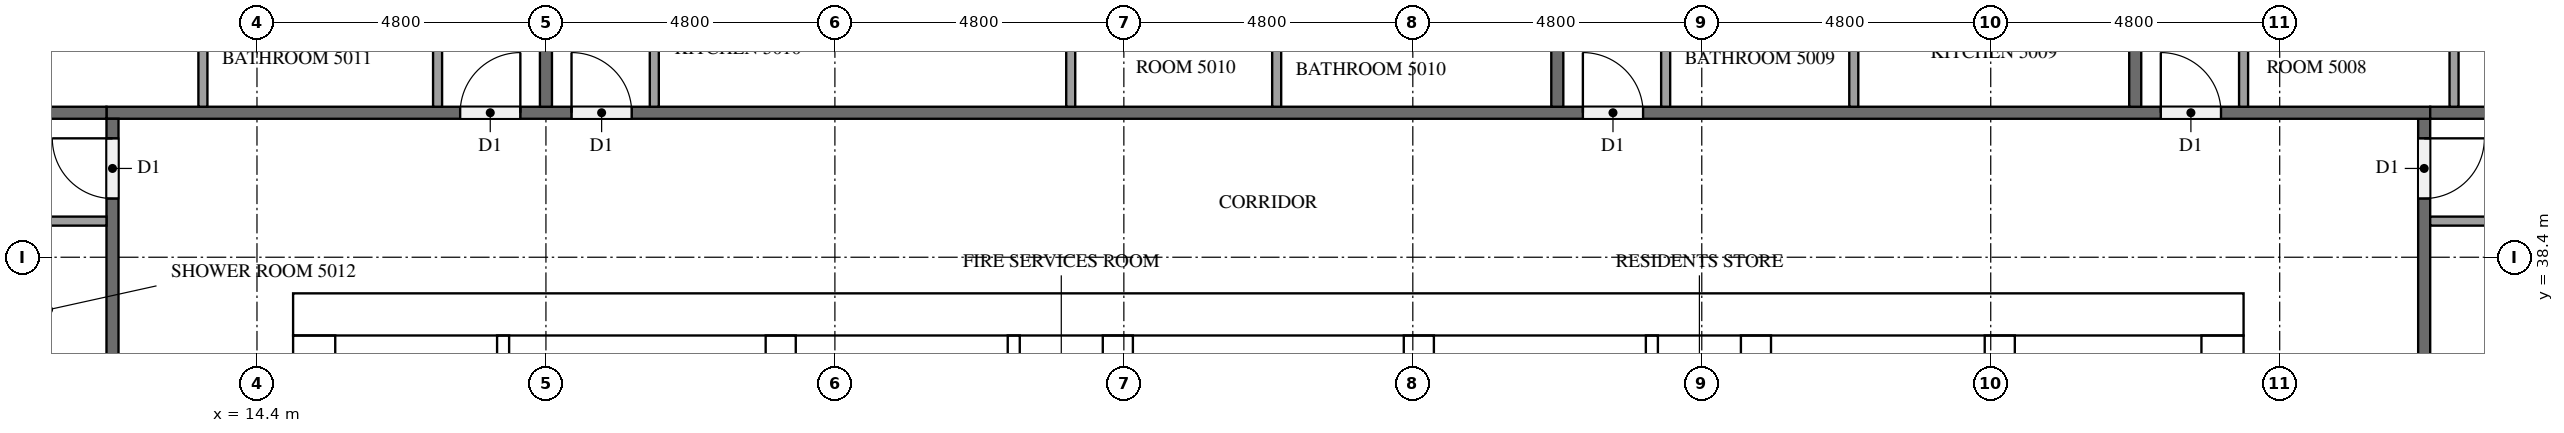
"""IFC4 building model, lengths in metres.
Left out: names, types, materials, properties, quantities, classifications, styles, units other than length and angle.
Written with IfcOpenShell. Run it as: python <this file> out.ifc"""

import sys

from ifc_helpers import new_model, si_unit, direction, frame, frame_2d, origin, place, context, subcontext, project, spatial, rectangle, extrude, element, fill, save


model = new_model("IFC4")
c1 = context("Model", 3, precision=1e-05, world=origin(), true_north=direction((0.0, 1.0)))
c2 = subcontext(c1, "Body", "Model", "MODEL_VIEW")
j1 = project(units=[si_unit("LENGTHUNIT", "METRE"), si_unit("PLANEANGLEUNIT", "RADIAN")], contexts=[c1])
p1 = place(None, origin())
s1 = spatial("IfcSite", under=j1, at=p1, CompositionType="ELEMENT")
p2 = place(p1, origin())
s2 = spatial("IfcBuilding", under=s1, at=p2, CompositionType="ELEMENT")
p3 = place(p2, frame((0.0, 0.0, 192.9)))
s3 = spatial("IfcBuildingStorey", under=s2, at=p3, CompositionType="ELEMENT", Elevation=192.9)
p4 = place(p3, frame((15.0, 37.45, 0.0), z_axis=(0.0, 0.0, 1.0), x_axis=(1.0, 0.0, 0.0)))
e1 = element("IfcWall", 1, at=p4, inside=s3, PredefinedType="SHEAR", context=c2, shape_type="SweptSolid", body=[
    extrude(rectangle(XDim=32.4, YDim=0.7, at=frame_2d((16.2, 0.0))), origin(), (0.0, 0.0, 1.0), 3.2),
])
p5 = place(p4, frame((15.3, 0.0, 0.0)))
e2 = element("IfcOpeningElement", 2, at=p5, cuts=e1, PredefinedType="OPENING", context=c2, shape_type="SweptSolid", body=[
    extrude(rectangle(XDim=1.8, YDim=2.1, at=frame_2d((0.9, 1.05))), frame((0.0, 0.36, 0.0), z_axis=(0.0, -1.0, 0.0), x_axis=(1.0, 0.0, 0.0)), (0.0, 0.0, 1.0), 0.72),
])
p6 = place(p4, frame((1.544, 0.0, 0.0)))
e3 = element("IfcOpeningElement", 3, at=p6, cuts=e1, PredefinedType="OPENING", context=c2, shape_type="SweptSolid", body=[
    extrude(rectangle(XDim=1.0, YDim=2.1, at=frame_2d((0.5, 1.05))), frame((0.0, 0.36, 0.0), z_axis=(0.0, -1.0, 0.0), x_axis=(1.0, 0.0, 0.0)), (0.0, 0.0, 1.0), 0.72),
])
p7 = place(p4, frame((5.219, 0.0, 0.0)))
e4 = element("IfcOpeningElement", 4, at=p7, cuts=e1, PredefinedType="OPENING", context=c2, shape_type="SweptSolid", body=[
    extrude(rectangle(XDim=1.0, YDim=2.1, at=frame_2d((0.5, 1.05))), frame((0.0, 0.36, 0.0), z_axis=(0.0, -1.0, 0.0), x_axis=(1.0, 0.0, 0.0)), (0.0, 0.0, 1.0), 0.72),
])
p8 = place(p3, frame((15.35, 15.7, 0.0), z_axis=(0.0, 0.0, 1.0), x_axis=(0.0, 1.0, 0.0)))
e5 = element("IfcWall", 5, at=p8, inside=s3, PredefinedType="SHEAR", context=c2, shape_type="SweptSolid", body=[
    extrude(rectangle(XDim=21.4, YDim=0.7, at=frame_2d((10.7, 0.0))), origin(), (0.0, 0.0, 1.0), 3.2),
])
p9 = place(p8, frame((5.06, 0.0, 0.0)))
e6 = element("IfcOpeningElement", 6, at=p9, cuts=e5, PredefinedType="OPENING", context=c2, shape_type="SweptSolid", body=[
    extrude(rectangle(XDim=1.2, YDim=2.1, at=frame_2d((0.6, 1.05))), frame((0.0, 0.36, 0.0), z_axis=(0.0, -1.0, 0.0), x_axis=(1.0, 0.0, 0.0)), (0.0, 0.0, 1.0), 0.72),
])
p10 = place(p3, frame((47.05, 15.7, 0.0), z_axis=(0.0, 0.0, 1.0), x_axis=(0.0, 1.0, 0.0)))
e7 = element("IfcWall", 7, at=p10, inside=s3, PredefinedType="SHEAR", context=c2, shape_type="SweptSolid", body=[
    extrude(rectangle(XDim=21.4, YDim=0.7, at=frame_2d((10.7, 0.0))), origin(), (0.0, 0.0, 1.0), 3.2),
])
p11 = place(p10, frame((10.4, 0.0, 0.0)))
e8 = element("IfcOpeningElement", 8, at=p11, cuts=e7, PredefinedType="OPENING", context=c2, shape_type="SweptSolid", body=[
    extrude(rectangle(XDim=1.2, YDim=2.1, at=frame_2d((0.6, 1.05))), frame((0.0, 0.36, 0.0), z_axis=(0.0, -1.0, 0.0), x_axis=(1.0, 0.0, 0.0)), (0.0, 0.0, 1.0), 0.72),
])
p12 = place(p3, frame((23.1, 15.7, 0.0), z_axis=(0.0, 0.0, 1.0), x_axis=(0.0, 1.0, 0.0)))
e9 = element("IfcWall", 9, at=p12, inside=s3, PredefinedType="SHEAR", context=c2, shape_type="SweptSolid", body=[
    extrude(rectangle(XDim=21.4, YDim=0.5, at=frame_2d((10.7, 0.0))), origin(), (0.0, 0.0, 1.0), 3.2),
])
p13 = place(p3, frame((39.3, 27.75, 0.0), z_axis=(0.0, 0.0, 1.0), x_axis=(0.0, 1.0, 0.0)))
e10 = element("IfcWall", 10, at=p13, inside=s3, PredefinedType="SHEAR", context=c2, shape_type="SweptSolid", body=[
    extrude(rectangle(XDim=9.35, YDim=0.5, at=frame_2d((4.675, 0.0))), origin(), (0.0, 0.0, 1.0), 3.2),
])
p14 = place(p3, frame((43.35, 27.75, 0.0), z_axis=(0.0, 0.0, 1.0), x_axis=(0.0, 1.0, 0.0)))
e11 = element("IfcWall", 11, at=p14, inside=s3, PredefinedType="SHEAR", context=c2, shape_type="SweptSolid", body=[
    extrude(rectangle(XDim=9.35, YDim=0.5, at=frame_2d((4.675, 0.0))), origin(), (0.0, 0.0, 1.0), 3.2),
])
p15 = place(p14, frame((7.65, 0.0, 0.0)))
e12 = element("IfcOpeningElement", 12, at=p15, cuts=e11, PredefinedType="OPENING", context=c2, shape_type="SweptSolid", body=[
    extrude(rectangle(XDim=1.2, YDim=2.1, at=frame_2d((0.6, 1.05))), frame((0.0, 0.26, 0.0), z_axis=(0.0, -1.0, 0.0), x_axis=(1.0, 0.0, 0.0)), (0.0, 0.0, 1.0), 0.52),
])
for number, where, z_axis, x_axis in (
    (13, (28.7, 33.8, 0.0), (0.0, 0.0, 1.0), (0.0, 1.0, 0.0)),
    (14, (33.7, 33.8, 0.0), (0.0, 0.0, 1.0), (0.0, 1.0, 0.0)),
):
    element("IfcWall", number, at=place(p3, frame(where, z_axis=z_axis, x_axis=x_axis)), inside=s3, PredefinedType="SHEAR", context=c2, shape_type="SweptSolid", body=[
        extrude(rectangle(XDim=3.3, YDim=0.5, at=frame_2d((1.65, 0.0))), origin(), (0.0, 0.0, 1.0), 3.2),
    ])
p16 = place(p3, frame((18.489, 31.5, 0.0), z_axis=(0.0, 0.0, 1.0), x_axis=(0.0, 1.0, 0.0)))
e15 = element("IfcWall", 15, at=p16, inside=s3, PredefinedType="PARTITIONING", context=c2, shape_type="SweptSolid", body=[
    extrude(rectangle(XDim=5.6, YDim=0.2, at=frame_2d((2.8, 0.0))), origin(), (0.0, 0.0, 1.0), 3.2),
])
for number, where, z_axis, x_axis in (
    (16, (26.971, 33.8, 0.0), (0.0, 0.0, 1.0), (0.0, 1.0, 0.0)),
    (17, (37.571, 33.8, 0.0), (0.0, 0.0, 1.0), (0.0, 1.0, 0.0)),
):
    element("IfcWall", number, at=place(p3, frame(where, z_axis=z_axis, x_axis=x_axis)), inside=s3, PredefinedType="PARTITIONING", context=c2, shape_type="SweptSolid", body=[
        extrude(rectangle(XDim=3.3, YDim=0.2, at=frame_2d((1.65, 0.0))), origin(), (0.0, 0.0, 1.0), 3.2),
    ])
p17 = place(p3, frame((50.4, 40.7, 0.0), z_axis=(0.0, 0.0, 1.0), x_axis=(0.0, -1.0, 0.0)))
e18 = element("IfcWall", 18, at=p17, inside=s3, PredefinedType="PARTITIONING", context=c2, shape_type="SweptSolid", body=[
    extrude(rectangle(XDim=28.6, YDim=0.2, at=frame_2d((14.3, 0.0))), origin(), (0.0, 0.0, 1.0), 3.2),
])
p18 = place(p17, frame((21.925, 0.0, 0.0)))
e19 = element("IfcOpeningElement", 19, at=p18, cuts=e18, PredefinedType="OPENING", context=c2, shape_type="SweptSolid", body=[
    extrude(rectangle(XDim=1.0, YDim=2.1, at=frame_2d((0.5, 1.05))), frame((0.0, 0.11, 0.0), z_axis=(0.0, -1.0, 0.0), x_axis=(1.0, 0.0, 0.0)), (0.0, 0.0, 1.0), 0.22),
])
p19 = place(p17, frame((20.075, 0.0, 0.0)))
e20 = element("IfcOpeningElement", 20, at=p19, cuts=e18, PredefinedType="OPENING", context=c2, shape_type="SweptSolid", body=[
    extrude(rectangle(XDim=1.0, YDim=2.1, at=frame_2d((0.5, 1.05))), frame((0.0, 0.11, 0.0), z_axis=(0.0, -1.0, 0.0), x_axis=(1.0, 0.0, 0.0)), (0.0, 0.0, 1.0), 0.22),
])
p20 = place(p17, frame((0.325, 0.0, 0.0)))
e21 = element("IfcOpeningElement", 21, at=p20, cuts=e18, PredefinedType="OPENING", context=c2, shape_type="SweptSolid", body=[
    extrude(rectangle(XDim=1.0, YDim=2.1, at=frame_2d((0.5, 1.05))), frame((0.0, 0.11, 0.0), z_axis=(0.0, -1.0, 0.0), x_axis=(1.0, 0.0, 0.0)), (0.0, 0.0, 1.0), 0.22),
])
p21 = place(p3, frame((11.9, 40.8, 0.0), z_axis=(0.0, 0.0, 1.0), x_axis=(1.0, 0.0, 0.0)))
e22 = element("IfcWall", 22, at=p21, inside=s3, PredefinedType="PARTITIONING", context=c2, shape_type="SweptSolid", body=[
    extrude(rectangle(XDim=38.6, YDim=0.2, at=frame_2d((19.3, 0.0))), origin(), (0.0, 0.0, 1.0), 3.2),
])
p22 = place(p21, frame((34.125, 0.0, 0.0)))
e23 = element("IfcOpeningElement", 23, at=p22, cuts=e22, PredefinedType="OPENING", context=c2, shape_type="SweptSolid", body=[
    extrude(rectangle(XDim=1.0, YDim=2.1, at=frame_2d((0.5, 1.05))), frame((0.0, 0.11, 0.0), z_axis=(0.0, -1.0, 0.0), x_axis=(1.0, 0.0, 0.0)), (0.0, 0.0, 1.0), 0.22),
])
p23 = place(p21, frame((24.525, 0.0, 0.0)))
e24 = element("IfcOpeningElement", 24, at=p23, cuts=e22, PredefinedType="OPENING", context=c2, shape_type="SweptSolid", body=[
    extrude(rectangle(XDim=1.0, YDim=2.1, at=frame_2d((0.5, 1.05))), frame((0.0, 0.11, 0.0), z_axis=(0.0, -1.0, 0.0), x_axis=(1.0, 0.0, 0.0)), (0.0, 0.0, 1.0), 0.22),
])
p24 = place(p21, frame((7.725, 0.0, 0.0)))
e25 = element("IfcOpeningElement", 25, at=p24, cuts=e22, PredefinedType="OPENING", context=c2, shape_type="SweptSolid", body=[
    extrude(rectangle(XDim=1.0, YDim=2.1, at=frame_2d((0.5, 1.05))), frame((0.0, 0.11, 0.0), z_axis=(0.0, -1.0, 0.0), x_axis=(1.0, 0.0, 0.0)), (0.0, 0.0, 1.0), 0.22),
])
p25 = place(p21, frame((5.875, 0.0, 0.0)))
e26 = element("IfcOpeningElement", 26, at=p25, cuts=e22, PredefinedType="OPENING", context=c2, shape_type="SweptSolid", body=[
    extrude(rectangle(XDim=1.0, YDim=2.1, at=frame_2d((0.5, 1.05))), frame((0.0, 0.11, 0.0), z_axis=(0.0, -1.0, 0.0), x_axis=(1.0, 0.0, 0.0)), (0.0, 0.0, 1.0), 0.22),
])
p26 = place(p3, frame((12.0, 12.1, 0.0), z_axis=(0.0, 0.0, 1.0), x_axis=(0.0, 1.0, 0.0)))
e27 = element("IfcWall", 27, at=p26, inside=s3, PredefinedType="PARTITIONING", context=c2, shape_type="SweptSolid", body=[
    extrude(rectangle(XDim=28.6, YDim=0.2, at=frame_2d((14.3, 0.0))), origin(), (0.0, 0.0, 1.0), 3.2),
])
p27 = place(p26, frame((27.275, 0.0, 0.0)))
e28 = element("IfcOpeningElement", 28, at=p27, cuts=e27, PredefinedType="OPENING", context=c2, shape_type="SweptSolid", body=[
    extrude(rectangle(XDim=1.0, YDim=2.1, at=frame_2d((0.5, 1.05))), frame((0.0, 0.11, 0.0), z_axis=(0.0, -1.0, 0.0), x_axis=(1.0, 0.0, 0.0)), (0.0, 0.0, 1.0), 0.22),
])
p28 = place(p26, frame((0.325, 0.0, 0.0)))
e29 = element("IfcOpeningElement", 29, at=p28, cuts=e27, PredefinedType="OPENING", context=c2, shape_type="SweptSolid", body=[
    extrude(rectangle(XDim=1.0, YDim=2.1, at=frame_2d((0.5, 1.05))), frame((0.0, 0.11, 0.0), z_axis=(0.0, -1.0, 0.0), x_axis=(1.0, 0.0, 0.0)), (0.0, 0.0, 1.0), 0.22),
])
p29 = place(p3, frame((50.5, 40.8, 0.0), z_axis=(0.0, 0.0, 1.0), x_axis=(1.0, 0.0, 0.0)))
e30 = element("IfcWall", 30, at=p29, inside=s3, PredefinedType="PARTITIONING", context=c2, shape_type="SweptSolid", body=[
    extrude(rectangle(XDim=11.8, YDim=0.2, at=frame_2d((5.9, 0.0))), origin(), (0.0, 0.0, 1.0), 3.2),
])
for number, where, z_axis, x_axis in (
    (31, (45.6, 47.9, 0.0), (0.0, 0.0, 1.0), (0.0, -1.0, 0.0)),
    (32, (36.0, 47.9, 0.0), (0.0, 0.0, 1.0), (0.0, -1.0, 0.0)),
):
    element("IfcWall", number, at=place(p3, frame(where, z_axis=z_axis, x_axis=x_axis)), inside=s3, PredefinedType="PARTITIONING", context=c2, shape_type="SweptSolid", body=[
        extrude(rectangle(XDim=7.0, YDim=0.2, at=frame_2d((3.5, 0.0))), origin(), (0.0, 0.0, 1.0), 3.2),
    ])
p30 = place(p3, frame((19.2, 47.675, 0.0), z_axis=(0.0, 0.0, 1.0), x_axis=(0.0, -1.0, 0.0)))
e33 = element("IfcWall", 33, at=p30, inside=s3, PredefinedType="PARTITIONING", context=c2, shape_type="SweptSolid", body=[
    extrude(rectangle(XDim=6.775, YDim=0.2, at=frame_2d((3.388, 0.0))), origin(), (0.0, 0.0, 1.0), 3.2),
])
p31 = place(p3, frame((4.9, 40.8, 0.0), z_axis=(0.0, 0.0, 1.0), x_axis=(1.0, 0.0, 0.0)))
e34 = element("IfcWall", 34, at=p31, inside=s3, PredefinedType="PARTITIONING", context=c2, shape_type="SweptSolid", body=[
    extrude(rectangle(XDim=7.0, YDim=0.2, at=frame_2d((3.5, 0.0))), origin(), (0.0, 0.0, 1.0), 3.2),
])
p32 = place(p3, frame((50.5, 39.0, 0.0), z_axis=(0.0, 0.0, 1.0), x_axis=(1.0, 0.0, 0.0)))
e35 = element("IfcWall", 35, at=p32, inside=s3, PredefinedType="PARTITIONING", context=c2, shape_type="SweptSolid", body=[
    extrude(rectangle(XDim=3.875, YDim=0.15, at=frame_2d((1.938, 0.0))), origin(), (0.0, 0.0, 1.0), 3.2),
])
p33 = place(p3, frame((50.896, 40.9, 0.0), z_axis=(0.0, 0.0, 1.0), x_axis=(0.0, 1.0, 0.0)))
e36 = element("IfcWall", 36, at=p33, inside=s3, PredefinedType="PARTITIONING", context=c2, shape_type="SweptSolid", body=[
    extrude(rectangle(XDim=1.925, YDim=0.15, at=frame_2d((0.962, 0.0))), origin(), (0.0, 0.0, 1.0), 3.2),
])
p34 = place(p3, frame((47.4, 40.9, 0.0), z_axis=(0.0, 0.0, 1.0), x_axis=(0.0, 1.0, 0.0)))
e37 = element("IfcWall", 37, at=p34, inside=s3, PredefinedType="PARTITIONING", context=c2, shape_type="SweptSolid", body=[
    extrude(rectangle(XDim=2.075, YDim=0.15, at=frame_2d((1.038, 0.0))), origin(), (0.0, 0.0, 1.0), 3.2),
])
p35 = place(p3, frame((40.925, 40.9, 0.0), z_axis=(0.0, 0.0, 1.0), x_axis=(0.0, 1.0, 0.0)))
e38 = element("IfcWall", 38, at=p35, inside=s3, PredefinedType="PARTITIONING", context=c2, shape_type="SweptSolid", body=[
    extrude(rectangle(XDim=1.775, YDim=0.15, at=frame_2d((0.888, 0.0))), origin(), (0.0, 0.0, 1.0), 3.2),
])
for number, where, z_axis, x_axis in (
    (39, (37.8, 40.9, 0.0), (0.0, 0.0, 1.0), (0.0, 1.0, 0.0)),
    (40, (27.917, 40.9, 0.0), (0.0, 0.0, 1.0), (0.0, 1.0, 0.0)),
    (41, (31.338, 40.9, 0.0), (0.0, 0.0, 1.0), (0.0, 1.0, 0.0)),
):
    element("IfcWall", number, at=place(p3, frame(where, z_axis=z_axis, x_axis=x_axis)), inside=s3, PredefinedType="PARTITIONING", context=c2, shape_type="SweptSolid", body=[
        extrude(rectangle(XDim=1.925, YDim=0.15, at=frame_2d((0.962, 0.0))), origin(), (0.0, 0.0, 1.0), 3.2),
    ])
for number, where, z_axis, x_axis in (
    (42, (21.0, 40.9, 0.0), (0.0, 0.0, 1.0), (0.0, 1.0, 0.0)),
    (43, (13.502, 40.9, 0.0), (0.0, 0.0, 1.0), (0.0, 1.0, 0.0)),
):
    element("IfcWall", number, at=place(p3, frame(where, z_axis=z_axis, x_axis=x_axis)), inside=s3, PredefinedType="PARTITIONING", context=c2, shape_type="SweptSolid", body=[
        extrude(rectangle(XDim=2.075, YDim=0.15, at=frame_2d((1.038, 0.0))), origin(), (0.0, 0.0, 1.0), 3.2),
    ])
p36 = place(p3, frame((17.4, 40.9, 0.0), z_axis=(0.0, 0.0, 1.0), x_axis=(0.0, 1.0, 0.0)))
e44 = element("IfcWall", 44, at=p36, inside=s3, PredefinedType="PARTITIONING", context=c2, shape_type="SweptSolid", body=[
    extrude(rectangle(XDim=2.225, YDim=0.15, at=frame_2d((1.113, 0.0))), origin(), (0.0, 0.0, 1.0), 3.2),
])
p37 = place(p3, frame((11.9, 39.0, 0.0), z_axis=(0.0, 0.0, 1.0), x_axis=(-1.0, 0.0, 0.0)))
e45 = element("IfcWall", 45, at=p37, inside=s3, PredefinedType="PARTITIONING", context=c2, shape_type="SweptSolid", body=[
    extrude(rectangle(XDim=2.075, YDim=0.15, at=frame_2d((1.038, 0.0))), origin(), (0.0, 0.0, 1.0), 3.2),
])
p38 = place(p5, origin())
e46 = element("IfcDoor", 46, at=p38, inside=s3, OperationType="DOUBLE_DOOR_SINGLE_SWING", PredefinedType="DOOR", context=c2, shape_type="SweptSolid", body=[
    extrude(rectangle(XDim=1.8, YDim=2.1, at=frame_2d((0.9, 1.05))), frame((0.0, 0.025, 0.0), z_axis=(0.0, -1.0, 0.0), x_axis=(1.0, 0.0, 0.0)), (0.0, 0.0, 1.0), 0.05),
])
fill(e2, e46)
p39 = place(p6, origin())
e47 = element("IfcDoor", 47, at=p39, inside=s3, OperationType="SINGLE_SWING_LEFT", PredefinedType="DOOR", context=c2, shape_type="SweptSolid", body=[
    extrude(rectangle(XDim=1.0, YDim=2.1, at=frame_2d((0.5, 1.05))), frame((0.0, 0.025, 0.0), z_axis=(0.0, -1.0, 0.0), x_axis=(1.0, 0.0, 0.0)), (0.0, 0.0, 1.0), 0.05),
])
fill(e3, e47)
p40 = place(p7, origin())
e48 = element("IfcDoor", 48, at=p40, inside=s3, OperationType="SINGLE_SWING_RIGHT", PredefinedType="DOOR", context=c2, shape_type="SweptSolid", body=[
    extrude(rectangle(XDim=1.0, YDim=2.1, at=frame_2d((0.5, 1.05))), frame((0.0, 0.025, 0.0), z_axis=(0.0, -1.0, 0.0), x_axis=(1.0, 0.0, 0.0)), (0.0, 0.0, 1.0), 0.05),
])
fill(e4, e48)
p41 = place(p20, origin())
e49 = element("IfcDoor", 49, at=p41, inside=s3, OperationType="SINGLE_SWING_LEFT", PredefinedType="DOOR", context=c2, shape_type="SweptSolid", body=[
    extrude(rectangle(XDim=1.0, YDim=2.1, at=frame_2d((0.5, 1.05))), frame((0.0, 0.025, 0.0), z_axis=(0.0, -1.0, 0.0), x_axis=(1.0, 0.0, 0.0)), (0.0, 0.0, 1.0), 0.05),
])
fill(e21, e49)
p42 = place(p22, origin())
e50 = element("IfcDoor", 50, at=p42, inside=s3, OperationType="SINGLE_SWING_LEFT", PredefinedType="DOOR", context=c2, shape_type="SweptSolid", body=[
    extrude(rectangle(XDim=1.0, YDim=2.1, at=frame_2d((0.5, 1.05))), frame((0.0, 0.025, 0.0), z_axis=(0.0, -1.0, 0.0), x_axis=(1.0, 0.0, 0.0)), (0.0, 0.0, 1.0), 0.05),
])
fill(e23, e50)
p43 = place(p23, origin())
e51 = element("IfcDoor", 51, at=p43, inside=s3, OperationType="SINGLE_SWING_LEFT", PredefinedType="DOOR", context=c2, shape_type="SweptSolid", body=[
    extrude(rectangle(XDim=1.0, YDim=2.1, at=frame_2d((0.5, 1.05))), frame((0.0, 0.025, 0.0), z_axis=(0.0, -1.0, 0.0), x_axis=(1.0, 0.0, 0.0)), (0.0, 0.0, 1.0), 0.05),
])
fill(e24, e51)
p44 = place(p24, origin())
e52 = element("IfcDoor", 52, at=p44, inside=s3, OperationType="SINGLE_SWING_LEFT", PredefinedType="DOOR", context=c2, shape_type="SweptSolid", body=[
    extrude(rectangle(XDim=1.0, YDim=2.1, at=frame_2d((0.5, 1.05))), frame((0.0, 0.025, 0.0), z_axis=(0.0, -1.0, 0.0), x_axis=(1.0, 0.0, 0.0)), (0.0, 0.0, 1.0), 0.05),
])
fill(e25, e52)
p45 = place(p25, origin())
e53 = element("IfcDoor", 53, at=p45, inside=s3, OperationType="SINGLE_SWING_RIGHT", PredefinedType="DOOR", context=c2, shape_type="SweptSolid", body=[
    extrude(rectangle(XDim=1.0, YDim=2.1, at=frame_2d((0.5, 1.05))), frame((0.0, 0.025, 0.0), z_axis=(0.0, -1.0, 0.0), x_axis=(1.0, 0.0, 0.0)), (0.0, 0.0, 1.0), 0.05),
])
fill(e26, e53)
p46 = place(p27, origin())
e54 = element("IfcDoor", 54, at=p46, inside=s3, OperationType="SINGLE_SWING_RIGHT", PredefinedType="DOOR", context=c2, shape_type="SweptSolid", body=[
    extrude(rectangle(XDim=1.0, YDim=2.1, at=frame_2d((0.5, 1.05))), frame((0.0, 0.025, 0.0), z_axis=(0.0, -1.0, 0.0), x_axis=(1.0, 0.0, 0.0)), (0.0, 0.0, 1.0), 0.05),
])
fill(e28, e54)
save(model, sys.argv[1])
